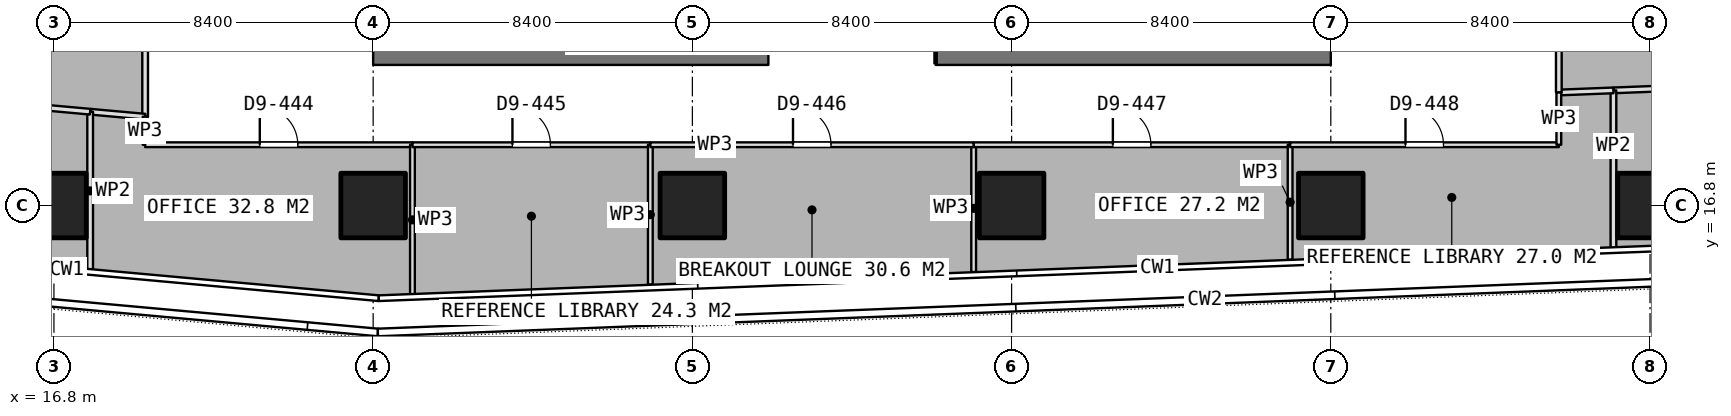
"""IFC4 building model, lengths in metres.
Left out: names, types, materials, properties, quantities, classifications, styles, units other than length and angle.
Written with IfcOpenShell. Run it as: python <this file> out.ifc"""

import sys

from ifc_helpers import new_model, si_unit, direction, frame, frame_2d, origin, origin_2d, place, context, subcontext, project, spatial, rectangle, extrude, element, fill, save


model = new_model("IFC4")
c1 = context("Model", 3, precision=1e-05, world=origin(), true_north=direction((0.0, 1.0)))
c2 = subcontext(c1, "Body", "Model", "MODEL_VIEW")
j1 = project(units=[si_unit("LENGTHUNIT", "METRE"), si_unit("PLANEANGLEUNIT", "RADIAN")], contexts=[c1])
p1 = place(None, origin())
s1 = spatial("IfcSite", under=j1, at=p1, CompositionType="ELEMENT")
p2 = place(p1, origin())
s2 = spatial("IfcBuilding", under=s1, at=p2, CompositionType="ELEMENT")
p3 = place(p2, frame((0.0, 0.0, 121.55)))
s3 = spatial("IfcBuildingStorey", under=s2, at=p3, CompositionType="ELEMENT", Elevation=121.55)
p4 = place(p3, frame((25.2, 21.0, 0.0), z_axis=(0.0, 0.0, 1.0), x_axis=(1.0, 0.0, 0.0)))
e1 = element("IfcWall", 1, at=p4, inside=s3, PredefinedType="SHEAR", context=c2, shape_type="SweptSolid", body=[
    extrude(rectangle(XDim=10.4, YDim=1.0, at=frame_2d((5.2, 0.0))), origin(), (0.0, 0.0, 1.0), 3.75),
])
p5 = place(p3, frame((40.0, 21.0, 0.0), z_axis=(0.0, 0.0, 1.0), x_axis=(1.0, 0.0, 0.0)))
e2 = element("IfcWall", 2, at=p5, inside=s3, PredefinedType="SHEAR", context=c2, shape_type="SweptSolid", body=[
    extrude(rectangle(XDim=10.4, YDim=1.0, at=frame_2d((5.2, 0.0))), origin(), (0.0, 0.0, 1.0), 3.75),
])
for number, where, z_axis, x_axis in (
    (3, (16.8, 16.8, 0.0), (0.0, 0.0, 1.0), (1.0, 0.0, 0.0)),
    (4, (25.2, 16.8, 0.0), (0.0, 0.0, 1.0), (1.0, 0.0, 0.0)),
    (5, (33.6, 16.8, 0.0), (0.0, 0.0, 1.0), (1.0, 0.0, 0.0)),
    (6, (42.0, 16.8, 0.0), (0.0, 0.0, 1.0), (1.0, 0.0, 0.0)),
    (7, (50.4, 16.8, 0.0), (0.0, 0.0, 1.0), (1.0, 0.0, 0.0)),
    (8, (58.8, 16.8, 0.0), (0.0, 0.0, 1.0), (1.0, 0.0, 0.0)),
):
    element("IfcColumn", number, at=place(p3, frame(where, z_axis=z_axis, x_axis=x_axis)), inside=s3, PredefinedType="COLUMN", context=c2, shape_type="SweptSolid", body=[
        extrude(rectangle(XDim=1.7, YDim=1.7, at=origin_2d()), origin(), (0.0, 0.0, 1.0), 3.75),
    ])
p6 = place(p3, frame((64.041, 20.071, 0.0), z_axis=(0.0, 0.0, 1.0), x_axis=(-0.999246582692, -0.038810655482, 0.0)))
e9 = element("IfcWall", 9, at=p6, inside=s3, PredefinedType="PARTITIONING", context=c2, shape_type="SweptSolid", body=[
    extrude(rectangle(XDim=6.209, YDim=0.15, at=frame_2d((3.104, 0.0))), origin(), (0.0, 0.0, 1.0), 3.5),
])
p7 = place(p6, frame((2.604, 0.0, 0.0)))
e10 = element("IfcOpeningElement", 10, at=p7, cuts=e9, PredefinedType="OPENING", context=c2, shape_type="SweptSolid", body=[
    extrude(rectangle(XDim=1.0, YDim=2.1, at=frame_2d((0.5, 1.05))), frame((0.0, 0.085, 0.0), z_axis=(0.0, -1.0, 0.0), x_axis=(1.0, 0.0, 0.0)), (0.0, 0.0, 1.0), 0.17),
])
p8 = place(p3, frame((57.837, 19.83, 0.0), z_axis=(0.0, 0.0, 1.0), x_axis=(0.0, -1.0, 0.0)))
e11 = element("IfcWall", 11, at=p8, inside=s3, PredefinedType="PARTITIONING", context=c2, shape_type="SweptSolid", body=[
    extrude(rectangle(XDim=4.154, YDim=0.15, at=frame_2d((2.077, 0.0))), origin(), (0.0, 0.0, 1.0), 3.5),
])
p9 = place(p3, frame((57.836, 19.83, 0.0), z_axis=(0.0, 0.0, 1.0), x_axis=(-0.99923637883, -0.039072486761, 0.0)))
e12 = element("IfcWall", 12, at=p9, inside=s3, PredefinedType="PARTITIONING", context=c2, shape_type="SweptSolid", body=[
    extrude(rectangle(XDim=1.437, YDim=0.15, at=frame_2d((0.719, 0.0))), origin(), (0.0, 0.0, 1.0), 3.5),
])
p10 = place(p3, frame((56.4, 19.774, 0.0), z_axis=(0.0, 0.0, 1.0), x_axis=(0.0, 1.0, 0.0)))
e13 = element("IfcWall", 13, at=p10, inside=s3, PredefinedType="PARTITIONING", context=c2, shape_type="SweptSolid", body=[
    extrude(rectangle(XDim=1.301, YDim=0.15, at=frame_2d((0.65, 0.0))), origin(), (0.0, 0.0, 1.0), 3.5),
])
p11 = place(p3, frame((19.2, 21.075, 0.0), z_axis=(0.0, 0.0, 1.0), x_axis=(0.0, -1.0, 0.0)))
e14 = element("IfcWall", 14, at=p11, inside=s3, PredefinedType="PARTITIONING", context=c2, shape_type="SweptSolid", body=[
    extrude(rectangle(XDim=1.937, YDim=0.15, at=frame_2d((0.969, 0.0))), origin(), (0.0, 0.0, 1.0), 3.5),
])
p12 = place(p3, frame((19.2, 19.138, 0.0), z_axis=(0.0, 0.0, 1.0), x_axis=(-0.995920706464, 0.090232734836, 0.0)))
e15 = element("IfcWall", 15, at=p12, inside=s3, PredefinedType="PARTITIONING", context=c2, shape_type="SweptSolid", body=[
    extrude(rectangle(XDim=1.453, YDim=0.15, at=frame_2d((0.727, 0.0))), origin(), (0.0, 0.0, 1.0), 3.5),
])
p13 = place(p3, frame((17.753, 19.269, 0.0), z_axis=(0.0, 0.0, 1.0), x_axis=(0.0, -1.0, 0.0)))
e16 = element("IfcWall", 16, at=p13, inside=s3, PredefinedType="PARTITIONING", context=c2, shape_type="SweptSolid", body=[
    extrude(rectangle(XDim=4.167, YDim=0.15, at=frame_2d((2.083, 0.0))), origin(), (0.0, 0.0, 1.0), 3.5),
])
p14 = place(p3, frame((17.752, 19.269, 0.0), z_axis=(0.0, 0.0, 1.0), x_axis=(-0.995896565077, 0.090498793736, 0.0)))
e17 = element("IfcWall", 17, at=p14, inside=s3, PredefinedType="PARTITIONING", context=c2, shape_type="SweptSolid", body=[
    extrude(rectangle(XDim=6.553, YDim=0.15, at=frame_2d((3.276, 0.0))), origin(), (0.0, 0.0, 1.0), 3.5),
])
p15 = place(p14, frame((2.776, 0.0, 0.0)))
e18 = element("IfcOpeningElement", 18, at=p15, cuts=e17, PredefinedType="OPENING", context=c2, shape_type="SweptSolid", body=[
    extrude(rectangle(XDim=1.0, YDim=2.1, at=frame_2d((0.5, 1.05))), frame((0.0, 0.085, 0.0), z_axis=(0.0, -1.0, 0.0), x_axis=(1.0, 0.0, 0.0)), (0.0, 0.0, 1.0), 0.17),
])
p16 = place(p3, frame((41.002, 15.051, 0.0), z_axis=(0.0, 0.0, 1.0), x_axis=(0.0, 1.0, 0.0)))
e19 = element("IfcWall", 19, at=p16, inside=s3, PredefinedType="PARTITIONING", context=c2, shape_type="SweptSolid", body=[
    extrude(rectangle(XDim=3.349, YDim=0.125, at=frame_2d((1.674, 0.0))), origin(), (0.0, 0.0, 1.0), 3.5),
])
p17 = place(p3, frame((41.002, 18.4, 0.0), z_axis=(0.0, 0.0, 1.0), x_axis=(1.0, 0.0, 0.0)))
e20 = element("IfcWall", 20, at=p17, inside=s3, PredefinedType="PARTITIONING", context=c2, shape_type="SweptSolid", body=[
    extrude(rectangle(XDim=8.327, YDim=0.125, at=frame_2d((4.164, 0.0))), origin(), (0.0, 0.0, 1.0), 3.5),
])
p18 = place(p17, frame((3.663, 0.0, 0.0)))
e21 = element("IfcOpeningElement", 21, at=p18, cuts=e20, PredefinedType="OPENING", context=c2, shape_type="SweptSolid", body=[
    extrude(rectangle(XDim=1.0, YDim=2.1, at=frame_2d((0.5, 1.05))), frame((0.0, 0.073, 0.0), z_axis=(0.0, -1.0, 0.0), x_axis=(1.0, 0.0, 0.0)), (0.0, 0.0, 1.0), 0.145),
])
p19 = place(p3, frame((49.329, 18.4, 0.0), z_axis=(0.0, 0.0, 1.0), x_axis=(0.0, -1.0, 0.0)))
e22 = element("IfcWall", 22, at=p19, inside=s3, PredefinedType="PARTITIONING", context=c2, shape_type="SweptSolid", body=[
    extrude(rectangle(XDim=3.025, YDim=0.125, at=frame_2d((1.512, 0.0))), origin(), (0.0, 0.0, 1.0), 3.5),
])
p20 = place(p3, frame((49.33, 18.4, 0.0), z_axis=(0.0, 0.0, 1.0), x_axis=(1.0, 0.0, 0.0)))
e23 = element("IfcWall", 23, at=p20, inside=s3, PredefinedType="PARTITIONING", context=c2, shape_type="SweptSolid", body=[
    extrude(rectangle(XDim=7.07, YDim=0.125, at=frame_2d((3.535, 0.0))), origin(), (0.0, 0.0, 1.0), 3.5),
])
p21 = place(p20, frame((3.035, 0.0, 0.0)))
e24 = element("IfcOpeningElement", 24, at=p21, cuts=e23, PredefinedType="OPENING", context=c2, shape_type="SweptSolid", body=[
    extrude(rectangle(XDim=1.0, YDim=2.1, at=frame_2d((0.5, 1.05))), frame((0.0, 0.073, 0.0), z_axis=(0.0, -1.0, 0.0), x_axis=(1.0, 0.0, 0.0)), (0.0, 0.0, 1.0), 0.145),
])
p22 = place(p3, frame((56.4, 18.4, 0.0), z_axis=(0.0, 0.0, 1.0), x_axis=(0.0, 1.0, 0.0)))
e25 = element("IfcWall", 25, at=p22, inside=s3, PredefinedType="PARTITIONING", context=c2, shape_type="SweptSolid", body=[
    extrude(rectangle(XDim=1.374, YDim=0.125, at=frame_2d((0.687, 0.0))), origin(), (0.0, 0.0, 1.0), 3.5),
])
p23 = place(p3, frame((19.2, 19.138, 0.0), z_axis=(0.0, 0.0, 1.0), x_axis=(0.0, -1.0, 0.0)))
e26 = element("IfcWall", 26, at=p23, inside=s3, PredefinedType="PARTITIONING", context=c2, shape_type="SweptSolid", body=[
    extrude(rectangle(XDim=0.738, YDim=0.125, at=frame_2d((0.369, 0.0))), origin(), (0.0, 0.0, 1.0), 3.5),
])
p24 = place(p3, frame((19.2, 18.4, 0.0), z_axis=(0.0, 0.0, 1.0), x_axis=(1.0, 0.0, 0.0)))
e27 = element("IfcWall", 27, at=p24, inside=s3, PredefinedType="PARTITIONING", context=c2, shape_type="SweptSolid", body=[
    extrude(rectangle(XDim=7.034, YDim=0.125, at=frame_2d((3.517, 0.0))), origin(), (0.0, 0.0, 1.0), 3.5),
])
p25 = place(p24, frame((3.017, 0.0, 0.0)))
e28 = element("IfcOpeningElement", 28, at=p25, cuts=e27, PredefinedType="OPENING", context=c2, shape_type="SweptSolid", body=[
    extrude(rectangle(XDim=1.0, YDim=2.1, at=frame_2d((0.5, 1.05))), frame((0.0, 0.073, 0.0), z_axis=(0.0, -1.0, 0.0), x_axis=(1.0, 0.0, 0.0)), (0.0, 0.0, 1.0), 0.145),
])
p26 = place(p3, frame((26.234, 18.4, 0.0), z_axis=(0.0, 0.0, 1.0), x_axis=(0.0, -1.0, 0.0)))
e29 = element("IfcWall", 29, at=p26, inside=s3, PredefinedType="PARTITIONING", context=c2, shape_type="SweptSolid", body=[
    extrude(rectangle(XDim=3.954, YDim=0.125, at=frame_2d((1.977, 0.0))), origin(), (0.0, 0.0, 1.0), 3.5),
])
p27 = place(p3, frame((26.235, 18.4, 0.0), z_axis=(0.0, 0.0, 1.0), x_axis=(1.0, 0.0, 0.0)))
e30 = element("IfcWall", 30, at=p27, inside=s3, PredefinedType="PARTITIONING", context=c2, shape_type="SweptSolid", body=[
    extrude(rectangle(XDim=6.259, YDim=0.125, at=frame_2d((3.129, 0.0))), origin(), (0.0, 0.0, 1.0), 3.5),
])
p28 = place(p27, frame((2.63, 0.0, 0.0)))
e31 = element("IfcOpeningElement", 31, at=p28, cuts=e30, PredefinedType="OPENING", context=c2, shape_type="SweptSolid", body=[
    extrude(rectangle(XDim=1.0, YDim=2.1, at=frame_2d((0.5, 1.05))), frame((0.0, 0.073, 0.0), z_axis=(0.0, -1.0, 0.0), x_axis=(1.0, 0.0, 0.0)), (0.0, 0.0, 1.0), 0.145),
])
p29 = place(p3, frame((32.494, 18.4, 0.0), z_axis=(0.0, 0.0, 1.0), x_axis=(0.0, -1.0, 0.0)))
e32 = element("IfcWall", 32, at=p29, inside=s3, PredefinedType="PARTITIONING", context=c2, shape_type="SweptSolid", body=[
    extrude(rectangle(XDim=3.68, YDim=0.125, at=frame_2d((1.84, 0.0))), origin(), (0.0, 0.0, 1.0), 3.5),
])
p30 = place(p3, frame((32.495, 18.4, 0.0), z_axis=(0.0, 0.0, 1.0), x_axis=(1.0, 0.0, 0.0)))
e33 = element("IfcWall", 33, at=p30, inside=s3, PredefinedType="PARTITIONING", context=c2, shape_type="SweptSolid", body=[
    extrude(rectangle(XDim=8.506, YDim=0.125, at=frame_2d((4.253, 0.0))), origin(), (0.0, 0.0, 1.0), 3.5),
])
p31 = place(p30, frame((3.753, 0.0, 0.0)))
e34 = element("IfcOpeningElement", 34, at=p31, cuts=e33, PredefinedType="OPENING", context=c2, shape_type="SweptSolid", body=[
    extrude(rectangle(XDim=1.0, YDim=2.1, at=frame_2d((0.5, 1.05))), frame((0.0, 0.073, 0.0), z_axis=(0.0, -1.0, 0.0), x_axis=(1.0, 0.0, 0.0)), (0.0, 0.0, 1.0), 0.145),
])
p32 = place(p18, origin())
e35 = element("IfcDoor", 35, at=p32, inside=s3, OperationType="SINGLE_SWING_LEFT", PredefinedType="DOOR", context=c2, shape_type="SweptSolid", body=[
    extrude(rectangle(XDim=1.0, YDim=2.1, at=frame_2d((0.5, 1.05))), frame((0.0, 0.025, 0.0), z_axis=(0.0, -1.0, 0.0), x_axis=(1.0, 0.0, 0.0)), (0.0, 0.0, 1.0), 0.05),
])
fill(e21, e35)
p33 = place(p21, origin())
e36 = element("IfcDoor", 36, at=p33, inside=s3, OperationType="SINGLE_SWING_LEFT", PredefinedType="DOOR", context=c2, shape_type="SweptSolid", body=[
    extrude(rectangle(XDim=1.0, YDim=2.1, at=frame_2d((0.5, 1.05))), frame((0.0, 0.025, 0.0), z_axis=(0.0, -1.0, 0.0), x_axis=(1.0, 0.0, 0.0)), (0.0, 0.0, 1.0), 0.05),
])
fill(e24, e36)
p34 = place(p25, origin())
e37 = element("IfcDoor", 37, at=p34, inside=s3, OperationType="SINGLE_SWING_LEFT", PredefinedType="DOOR", context=c2, shape_type="SweptSolid", body=[
    extrude(rectangle(XDim=1.0, YDim=2.1, at=frame_2d((0.5, 1.05))), frame((0.0, 0.025, 0.0), z_axis=(0.0, -1.0, 0.0), x_axis=(1.0, 0.0, 0.0)), (0.0, 0.0, 1.0), 0.05),
])
fill(e28, e37)
p35 = place(p28, origin())
e38 = element("IfcDoor", 38, at=p35, inside=s3, OperationType="SINGLE_SWING_LEFT", PredefinedType="DOOR", context=c2, shape_type="SweptSolid", body=[
    extrude(rectangle(XDim=1.0, YDim=2.1, at=frame_2d((0.5, 1.05))), frame((0.0, 0.025, 0.0), z_axis=(0.0, -1.0, 0.0), x_axis=(1.0, 0.0, 0.0)), (0.0, 0.0, 1.0), 0.05),
])
fill(e31, e38)
p36 = place(p31, origin())
e39 = element("IfcDoor", 39, at=p36, inside=s3, OperationType="SINGLE_SWING_LEFT", PredefinedType="DOOR", context=c2, shape_type="SweptSolid", body=[
    extrude(rectangle(XDim=1.0, YDim=2.1, at=frame_2d((0.5, 1.05))), frame((0.0, 0.025, 0.0), z_axis=(0.0, -1.0, 0.0), x_axis=(1.0, 0.0, 0.0)), (0.0, 0.0, 1.0), 0.05),
])
fill(e34, e39)
save(model, sys.argv[1])
